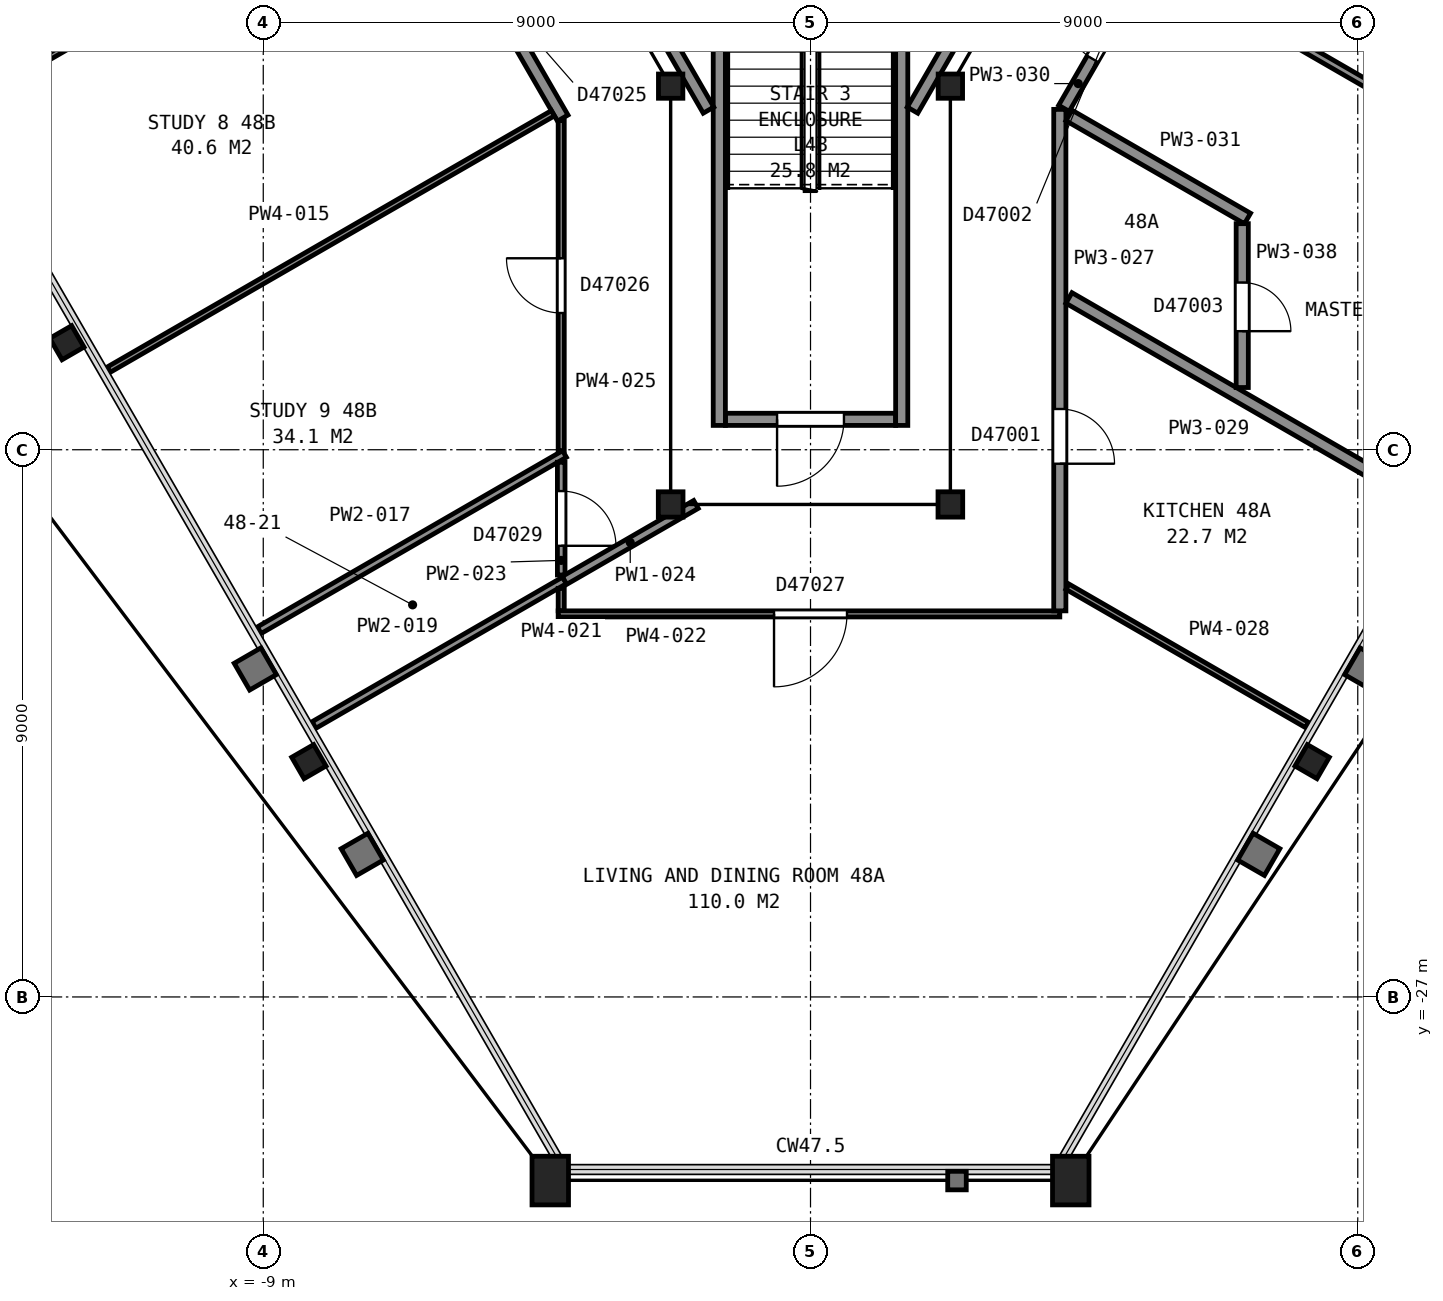
"""IFC4 building model, lengths in metres.
Left out: names, types, materials, properties, quantities, classifications, styles, units other than length and angle.
Written with IfcOpenShell. Run it as: python <this file> out.ifc"""

import sys

from ifc_helpers import new_model, si_unit, direction, frame, frame_2d, origin, origin_2d, place, context, subcontext, project, spatial, rectangle, hollow_rectangle, i_section, extrude, element, fill, save


model = new_model("IFC4")
c1 = context("Model", 3, precision=1e-05, world=origin(), true_north=direction((0.0, 1.0)))
c2 = subcontext(c1, "Body", "Model", "MODEL_VIEW")
j1 = project(units=[si_unit("LENGTHUNIT", "METRE"), si_unit("PLANEANGLEUNIT", "RADIAN")], contexts=[c1])
p1 = place(None, origin())
s1 = spatial("IfcSite", under=j1, at=p1, CompositionType="ELEMENT")
p2 = place(p1, origin())
s2 = spatial("IfcBuilding", under=s1, at=p2, CompositionType="ELEMENT")
p3 = place(p2, frame((0.0, 0.0, 193.2)))
s3 = spatial("IfcBuildingStorey", under=s2, at=p3, CompositionType="ELEMENT", Elevation=193.2)
for number, where, z_axis, x_axis in (
    (1, (-12.23, -16.24, 0.0), (0.0, 0.0, 1.0), (-0.5, 0.866, 0.0)),
    (2, (-8.25, -23.13, 0.0), (0.0, 0.0, 1.0), (-0.5, 0.866, 0.0)),
):
    element("IfcColumn", number, at=place(p3, frame(where, z_axis=z_axis, x_axis=x_axis)), inside=s3, PredefinedType="COLUMN", context=c2, shape_type="SweptSolid", body=[
        extrude(i_section(OverallWidth=0.406, OverallDepth=0.417, WebThickness=0.03, FlangeThickness=0.048, FilletRadius=0.015, at=origin_2d()), origin(), (0.0, 0.0, 1.0), 3.7),
    ])
for number, where, z_axis, x_axis in (
    (3, (-4.28, -30.02, 0.0), (0.0, 0.0, 1.0), (-1.0, 0.0, 0.0)),
    (4, (4.28, -30.02, 0.0), (0.0, 0.0, 1.0), (-1.0, 0.0, 0.0)),
):
    element("IfcColumn", number, at=place(p3, frame(where, z_axis=z_axis, x_axis=x_axis)), inside=s3, PredefinedType="COLUMN", context=c2, shape_type="SweptSolid", body=[
        extrude(hollow_rectangle(XDim=0.6, YDim=0.8, WallThickness=0.05, at=origin_2d()), origin(), (0.0, 0.0, 1.0), 3.7),
    ])
p4 = place(p3, frame((8.25, -23.13, 0.0), z_axis=(0.0, 0.0, 1.0), x_axis=(-0.5, -0.866025403784, 0.0)))
e5 = element("IfcColumn", 5, at=p4, inside=s3, PredefinedType="COLUMN", context=c2, shape_type="SweptSolid", body=[
    extrude(i_section(OverallWidth=0.406, OverallDepth=0.417, WebThickness=0.03, FlangeThickness=0.048, FilletRadius=0.015, at=origin_2d()), origin(), (0.0, 0.0, 1.0), 3.7),
])
p5 = place(p3, frame((-2.3, -12.02, 0.0), z_axis=(0.0, 0.0, 1.0), x_axis=(1.0, 0.0, 0.0)))
e6 = element("IfcColumn", 6, at=p5, inside=s3, PredefinedType="COLUMN", context=c2, shape_type="SweptSolid", body=[
    extrude(i_section(OverallWidth=0.401, OverallDepth=0.399, WebThickness=0.025, FlangeThickness=0.04, FilletRadius=0.015, at=origin_2d()), origin(), (0.0, 0.0, 1.0), 3.7),
])
for number, where, z_axis, x_axis in (
    (7, (-2.3, -18.9, 0.0), (0.0, 0.0, 1.0), (-1.0, 0.0, 0.0)),
    (8, (2.3, -18.9, 0.0), (0.0, 0.0, 1.0), (-1.0, 0.0, 0.0)),
):
    element("IfcColumn", number, at=place(p3, frame(where, z_axis=z_axis, x_axis=x_axis)), inside=s3, PredefinedType="COLUMN", context=c2, shape_type="SweptSolid", body=[
        extrude(i_section(OverallWidth=0.406, OverallDepth=0.417, WebThickness=0.03, FlangeThickness=0.048, FilletRadius=0.015, at=origin_2d()), origin(), (0.0, 0.0, 1.0), 3.7),
    ])
p6 = place(p3, frame((2.3, -12.02, 0.0), z_axis=(0.0, 0.0, 1.0), x_axis=(1.0, 0.0, 0.0)))
e9 = element("IfcColumn", 9, at=p6, inside=s3, PredefinedType="COLUMN", context=c2, shape_type="SweptSolid", body=[
    extrude(i_section(OverallWidth=0.401, OverallDepth=0.399, WebThickness=0.025, FlangeThickness=0.04, FilletRadius=0.015, at=origin_2d()), origin(), (0.0, 0.0, 1.0), 3.7),
])
p7 = place(p3, frame((-1.4, -17.5, 0.0), z_axis=(0.0, 0.0, 1.0), x_axis=(1.0, 0.0, 0.0)))
e10 = element("IfcWall", 10, at=p7, inside=s3, PredefinedType="PARTITIONING", context=c2, shape_type="SweptSolid", body=[
    extrude(rectangle(XDim=2.8, YDim=0.2, at=frame_2d((1.4, 0.0))), origin(), (0.0, 0.0, 1.0), 3.45),
])
p8 = place(p7, frame((0.85, 0.0, 0.0)))
e11 = element("IfcOpeningElement", 11, at=p8, cuts=e10, PredefinedType="OPENING", context=c2, shape_type="SweptSolid", body=[
    extrude(rectangle(XDim=1.1, YDim=2.1, at=frame_2d((0.55, 1.05))), frame((0.0, 0.11, 0.0), z_axis=(0.0, -1.0, 0.0), x_axis=(1.0, 0.0, 0.0)), (0.0, 0.0, 1.0), 0.22),
])
for number, where, z_axis, x_axis in (
    (12, (1.5, -8.0, 0.0), (0.0, 0.0, 1.0), (0.0, -1.0, 0.0)),
    (13, (-1.5, -8.0, 0.0), (0.0, 0.0, 1.0), (0.0, -1.0, 0.0)),
):
    element("IfcWall", number, at=place(p3, frame(where, z_axis=z_axis, x_axis=x_axis)), inside=s3, PredefinedType="PARTITIONING", context=c2, shape_type="SweptSolid", body=[
        extrude(rectangle(XDim=9.6, YDim=0.2, at=frame_2d((4.8, 0.0))), origin(), (0.0, 0.0, 1.0), 3.45),
    ])
p9 = place(p3, frame((-4.655, -7.257, 0.0), z_axis=(0.0, 0.0, 1.0), x_axis=(0.499966124405, -0.866044960985, 0.0)))
e14 = element("IfcWall", 14, at=p9, inside=s3, PredefinedType="PARTITIONING", context=c2, shape_type="SweptSolid", body=[
    extrude(rectangle(XDim=5.956, YDim=0.2, at=frame_2d((2.978, 0.0))), origin(), (0.0, 0.0, 1.0), 3.45),
])
p10 = place(p9, frame((0.45, 0.0, 0.0)))
e15 = element("IfcOpeningElement", 15, at=p10, cuts=e14, PredefinedType="OPENING", context=c2, shape_type="SweptSolid", body=[
    extrude(rectangle(XDim=1.8, YDim=2.1, at=frame_2d((0.9, 1.05))), frame((0.0, 0.11, 0.0), z_axis=(0.0, -1.0, 0.0), x_axis=(1.0, 0.0, 0.0)), (0.0, 0.0, 1.0), 0.22),
])
p11 = place(p3, frame((1.677, -12.415, 0.0), z_axis=(0.0, 0.0, 1.0), x_axis=(0.500054337157, 0.865994029939, 0.0)))
e16 = element("IfcWall", 16, at=p11, inside=s3, PredefinedType="PARTITIONING", context=c2, shape_type="SweptSolid", body=[
    extrude(rectangle(XDim=6.177, YDim=0.2, at=frame_2d((3.088, 0.0))), origin(), (0.0, 0.0, 1.0), 3.45),
])
p12 = place(p3, frame((-14.015, -12.396, 0.0), z_axis=(0.0, 0.0, 1.0), x_axis=(0.866079962101, 0.499905490315, 0.0)))
e17 = element("IfcWall", 17, at=p12, inside=s3, PredefinedType="PARTITIONING", context=c2, shape_type="SweptSolid", body=[
    extrude(rectangle(XDim=8.429, YDim=0.1, at=frame_2d((4.214, 0.0))), origin(), (0.0, 0.0, 1.0), 2.713),
])
p13 = place(p3, frame((-4.075, -12.545, 0.0), z_axis=(0.0, 0.0, 1.0), x_axis=(-0.499999743747, 0.866025551732, 0.0)))
e18 = element("IfcWall", 18, at=p13, inside=s3, PredefinedType="PARTITIONING", context=c2, shape_type="SweptSolid", body=[
    extrude(rectangle(XDim=17.656, YDim=0.2, at=frame_2d((8.828, 0.0))), origin(), (0.0, 0.0, 1.0), 2.713),
])
p14 = place(p13, frame((10.83, 0.0, 0.0)))
e19 = element("IfcOpeningElement", 19, at=p14, cuts=e18, PredefinedType="OPENING", context=c2, shape_type="SweptSolid", body=[
    extrude(rectangle(XDim=0.9, YDim=2.1, at=frame_2d((0.45, 1.05))), frame((0.0, 0.11, 0.0), z_axis=(0.0, -1.0, 0.0), x_axis=(1.0, 0.0, 0.0)), (0.0, 0.0, 1.0), 0.22),
])
p15 = place(p13, frame((7.148, 0.0, 0.0)))
e20 = element("IfcOpeningElement", 20, at=p15, cuts=e18, PredefinedType="OPENING", context=c2, shape_type="SweptSolid", body=[
    extrude(rectangle(XDim=0.9, YDim=2.1, at=frame_2d((0.45, 1.05))), frame((0.0, 0.11, 0.0), z_axis=(0.0, -1.0, 0.0), x_axis=(1.0, 0.0, 0.0)), (0.0, 0.0, 1.0), 0.22),
])
p16 = place(p13, frame((2.198, 0.0, 0.0)))
e21 = element("IfcOpeningElement", 21, at=p16, cuts=e18, PredefinedType="OPENING", context=c2, shape_type="SweptSolid", body=[
    extrude(rectangle(XDim=0.9, YDim=2.1, at=frame_2d((0.45, 1.05))), frame((0.0, 0.11, 0.0), z_axis=(0.0, -1.0, 0.0), x_axis=(1.0, 0.0, 0.0)), (0.0, 0.0, 1.0), 0.22),
])
p17 = place(p3, frame((-11.54, -16.682, 0.0), z_axis=(0.0, 0.0, 1.0), x_axis=(0.866063141794, 0.499934630153, 0.0)))
e22 = element("IfcWall", 22, at=p17, inside=s3, PredefinedType="PARTITIONING", context=c2, shape_type="SweptSolid", body=[
    extrude(rectangle(XDim=8.433, YDim=0.1, at=frame_2d((4.217, 0.0))), origin(), (0.0, 0.0, 1.0), 2.713),
])
p18 = place(p3, frame((-9.066, -20.968, 0.0), z_axis=(0.0, 0.0, 1.0), x_axis=(0.866023559602, 0.500003194204, 0.0)))
e23 = element("IfcWall", 23, at=p18, inside=s3, PredefinedType="PARTITIONING", context=c2, shape_type="SweptSolid", body=[
    extrude(rectangle(XDim=5.796, YDim=0.125, at=frame_2d((2.898, 0.0))), origin(), (0.0, 0.0, 1.0), 2.713),
])
p19 = place(p3, frame((-8.166, -22.527, 0.0), z_axis=(0.0, 0.0, 1.0), x_axis=(0.866042865666, 0.499969753915, 0.0)))
e24 = element("IfcWall", 24, at=p19, inside=s3, PredefinedType="PARTITIONING", context=c2, shape_type="SweptSolid", body=[
    extrude(rectangle(XDim=4.757, YDim=0.125, at=frame_2d((2.378, 0.0))), origin(), (0.0, 0.0, 1.0), 2.713),
])
p20 = place(p3, frame((-4.1, -20.65, 0.0), z_axis=(0.0, 0.0, 1.0), x_axis=(0.0, 1.0, 0.0)))
e25 = element("IfcWall", 25, at=p20, inside=s3, PredefinedType="PARTITIONING", context=c2, shape_type="SweptSolid", body=[
    extrude(rectangle(XDim=0.37, YDim=0.1, at=frame_2d((0.185, 0.0))), origin(), (0.0, 0.0, 1.0), 2.713),
])
p21 = place(p3, frame((4.1, -20.7, 0.0), z_axis=(0.0, 0.0, 1.0), x_axis=(-1.0, 0.0, 0.0)))
e26 = element("IfcWall", 26, at=p21, inside=s3, PredefinedType="PARTITIONING", context=c2, shape_type="SweptSolid", body=[
    extrude(rectangle(XDim=8.25, YDim=0.1, at=frame_2d((4.125, 0.0))), origin(), (0.0, 0.0, 1.0), 2.713),
])
p22 = place(p21, frame((3.5, 0.0, 0.0)))
e27 = element("IfcOpeningElement", 27, at=p22, cuts=e26, PredefinedType="OPENING", context=c2, shape_type="SweptSolid", body=[
    extrude(rectangle(XDim=1.2, YDim=2.1, at=frame_2d((0.6, 1.05))), frame((0.0, 0.06, 0.0), z_axis=(0.0, -1.0, 0.0), x_axis=(1.0, 0.0, 0.0)), (0.0, 0.0, 1.0), 0.12),
])
p23 = place(p3, frame((-4.1, -18.206, 0.0), z_axis=(0.0, 0.0, 1.0), x_axis=(0.0, -1.0, 0.0)))
e28 = element("IfcWall", 28, at=p23, inside=s3, PredefinedType="PARTITIONING", context=c2, shape_type="SweptSolid", body=[
    extrude(rectangle(XDim=1.854, YDim=0.125, at=frame_2d((0.927, 0.0))), origin(), (0.0, 0.0, 1.0), 2.713),
])
p24 = place(p23, frame((0.474, 0.0, 0.0)))
e29 = element("IfcOpeningElement", 29, at=p24, cuts=e28, PredefinedType="OPENING", context=c2, shape_type="SweptSolid", body=[
    extrude(rectangle(XDim=0.9, YDim=2.1, at=frame_2d((0.45, 1.05))), frame((0.0, 0.073, 0.0), z_axis=(0.0, -1.0, 0.0), x_axis=(1.0, 0.0, 0.0)), (0.0, 0.0, 1.0), 0.145),
])
p25 = place(p3, frame((-4.046, -20.149, 0.0), z_axis=(0.0, 0.0, 1.0), x_axis=(0.865916841101, 0.500187988959, 0.0)))
e30 = element("IfcWall", 30, at=p25, inside=s3, PredefinedType="PARTITIONING", context=c2, shape_type="SweptSolid", body=[
    extrude(rectangle(XDim=2.497, YDim=0.15, at=frame_2d((1.248, 0.0))), origin(), (0.0, 0.0, 1.0), 2.713),
])
p26 = place(p3, frame((-4.1, -18.016, 0.0), z_axis=(0.0, 0.0, 1.0), x_axis=(0.0, 1.0, 0.0)))
e31 = element("IfcWall", 31, at=p26, inside=s3, PredefinedType="PARTITIONING", context=c2, shape_type="SweptSolid", body=[
    extrude(rectangle(XDim=5.429, YDim=0.1, at=frame_2d((2.715, 0.0))), origin(), (0.0, 0.0, 1.0), 2.713),
])
p27 = place(p26, frame((2.265, 0.0, 0.0)))
e32 = element("IfcOpeningElement", 32, at=p27, cuts=e31, PredefinedType="OPENING", context=c2, shape_type="SweptSolid", body=[
    extrude(rectangle(XDim=0.9, YDim=2.1, at=frame_2d((0.45, 1.05))), frame((0.0, 0.06, 0.0), z_axis=(0.0, -1.0, 0.0), x_axis=(1.0, 0.0, 0.0)), (0.0, 0.0, 1.0), 0.12),
])
p28 = place(p3, frame((4.1, -12.402, 0.0), z_axis=(0.0, 0.0, 1.0), x_axis=(0.0, -1.0, 0.0)))
e33 = element("IfcWall", 33, at=p28, inside=s3, PredefinedType="PARTITIONING", context=c2, shape_type="SweptSolid", body=[
    extrude(rectangle(XDim=8.248, YDim=0.2, at=frame_2d((4.124, 0.0))), origin(), (0.0, 0.0, 1.0), 2.713),
])
p29 = place(p28, frame((4.928, 0.0, 0.0)))
e34 = element("IfcOpeningElement", 34, at=p29, cuts=e33, PredefinedType="OPENING", context=c2, shape_type="SweptSolid", body=[
    extrude(rectangle(XDim=0.9, YDim=2.1, at=frame_2d((0.45, 1.05))), frame((0.0, 0.11, 0.0), z_axis=(0.0, -1.0, 0.0), x_axis=(1.0, 0.0, 0.0)), (0.0, 0.0, 1.0), 0.22),
])
p30 = place(p3, frame((4.225, -20.252, 0.0), z_axis=(0.0, 0.0, 1.0), x_axis=(0.866048884701, -0.499959327653, 0.0)))
e35 = element("IfcWall", 35, at=p30, inside=s3, PredefinedType="PARTITIONING", context=c2, shape_type="SweptSolid", body=[
    extrude(rectangle(XDim=4.55, YDim=0.1, at=frame_2d((2.275, 0.0))), origin(), (0.0, 0.0, 1.0), 2.713),
])
p31 = place(p3, frame((4.25, -15.504, 0.0), z_axis=(0.0, 0.0, 1.0), x_axis=(0.866025383743, -0.500000034713, 0.0)))
e36 = element("IfcWall", 36, at=p31, inside=s3, PredefinedType="PARTITIONING", context=c2, shape_type="SweptSolid", body=[
    extrude(rectangle(XDim=6.903, YDim=0.2, at=frame_2d((3.451, 0.0))), origin(), (0.0, 0.0, 1.0), 2.713),
])
p32 = place(p3, frame((5.556, -9.98, 0.0), z_axis=(0.0, 0.0, 1.0), x_axis=(-0.499940639567, -0.866059672834, 0.0)))
e37 = element("IfcWall", 37, at=p32, inside=s3, PredefinedType="PARTITIONING", context=c2, shape_type="SweptSolid", body=[
    extrude(rectangle(XDim=2.777, YDim=0.2, at=frame_2d((1.388, 0.0))), origin(), (0.0, 0.0, 1.0), 2.713),
])
p33 = place(p32, frame((0.937, 0.0, 0.0)))
e38 = element("IfcOpeningElement", 38, at=p33, cuts=e37, PredefinedType="OPENING", context=c2, shape_type="SweptSolid", body=[
    extrude(rectangle(XDim=0.9, YDim=2.1, at=frame_2d((0.45, 1.05))), frame((0.0, 0.11, 0.0), z_axis=(0.0, -1.0, 0.0), x_axis=(1.0, 0.0, 0.0)), (0.0, 0.0, 1.0), 0.22),
])
p34 = place(p3, frame((4.25, -12.502, 0.0), z_axis=(0.0, 0.0, 1.0), x_axis=(0.866032087317, -0.499988423603, 0.0)))
e39 = element("IfcWall", 39, at=p34, inside=s3, PredefinedType="PARTITIONING", context=c2, shape_type="SweptSolid", body=[
    extrude(rectangle(XDim=3.39, YDim=0.2, at=frame_2d((1.695, 0.0))), origin(), (0.0, 0.0, 1.0), 2.713),
])
p35 = place(p3, frame((5.533, -9.895, 0.0), z_axis=(0.0, 0.0, 1.0), x_axis=(0.865995449608, -0.500051878567, 0.0)))
e40 = element("IfcWall", 40, at=p35, inside=s3, PredefinedType="PARTITIONING", context=c2, shape_type="SweptSolid", body=[
    extrude(rectangle(XDim=8.596, YDim=0.125, at=frame_2d((4.298, 0.0))), origin(), (0.0, 0.0, 1.0), 2.713),
])
p36 = place(p3, frame((6.576, -8.419, 0.0), z_axis=(0.0, 0.0, 1.0), x_axis=(0.866048155274, -0.499960591193, 0.0)))
e41 = element("IfcWall", 41, at=p36, inside=s3, PredefinedType="PARTITIONING", context=c2, shape_type="SweptSolid", body=[
    extrude(rectangle(XDim=8.431, YDim=0.125, at=frame_2d((4.215, 0.0))), origin(), (0.0, 0.0, 1.0), 2.713),
])
p37 = place(p3, frame((7.1, -16.977, 0.0), z_axis=(0.0, 0.0, 1.0), x_axis=(0.0, 1.0, 0.0)))
e42 = element("IfcWall", 42, at=p37, inside=s3, PredefinedType="PARTITIONING", context=c2, shape_type="SweptSolid", body=[
    extrude(rectangle(XDim=2.695, YDim=0.2, at=frame_2d((1.347, 0.0))), origin(), (0.0, 0.0, 1.0), 2.713),
])
p38 = place(p37, frame((0.927, 0.0, 0.0)))
e43 = element("IfcOpeningElement", 43, at=p38, cuts=e42, PredefinedType="OPENING", context=c2, shape_type="SweptSolid", body=[
    extrude(rectangle(XDim=0.8, YDim=2.1, at=frame_2d((0.4, 1.05))), frame((0.0, 0.11, 0.0), z_axis=(0.0, -1.0, 0.0), x_axis=(1.0, 0.0, 0.0)), (0.0, 0.0, 1.0), 0.22),
])
p39 = place(p8, origin())
e44 = element("IfcDoor", 44, at=p39, inside=s3, OperationType="SINGLE_SWING_LEFT", PredefinedType="DOOR", context=c2, shape_type="SweptSolid", body=[
    extrude(rectangle(XDim=1.1, YDim=2.1, at=frame_2d((0.55, 1.05))), frame((0.0, 0.025, 0.0), z_axis=(0.0, -1.0, 0.0), x_axis=(1.0, 0.0, 0.0)), (0.0, 0.0, 1.0), 0.05),
])
fill(e11, e44)
p40 = place(p22, origin())
e45 = element("IfcDoor", 45, at=p40, inside=s3, OperationType="SINGLE_SWING_RIGHT", PredefinedType="DOOR", context=c2, shape_type="SweptSolid", body=[
    extrude(rectangle(XDim=1.2, YDim=2.1, at=frame_2d((0.6, 1.05))), frame((0.0, 0.025, 0.0), z_axis=(0.0, -1.0, 0.0), x_axis=(1.0, 0.0, 0.0)), (0.0, 0.0, 1.0), 0.05),
])
fill(e27, e45)
p41 = place(p24, origin())
e46 = element("IfcDoor", 46, at=p41, inside=s3, OperationType="SINGLE_SWING_RIGHT", PredefinedType="DOOR", context=c2, shape_type="SweptSolid", body=[
    extrude(rectangle(XDim=0.9, YDim=2.1, at=frame_2d((0.45, 1.05))), frame((0.0, 0.025, 0.0), z_axis=(0.0, -1.0, 0.0), x_axis=(1.0, 0.0, 0.0)), (0.0, 0.0, 1.0), 0.05),
])
fill(e29, e46)
p42 = place(p27, origin())
e47 = element("IfcDoor", 47, at=p42, inside=s3, OperationType="SINGLE_SWING_RIGHT", PredefinedType="DOOR", context=c2, shape_type="SweptSolid", body=[
    extrude(rectangle(XDim=0.9, YDim=2.1, at=frame_2d((0.45, 1.05))), frame((0.0, 0.025, 0.0), z_axis=(0.0, -1.0, 0.0), x_axis=(1.0, 0.0, 0.0)), (0.0, 0.0, 1.0), 0.05),
])
fill(e32, e47)
p43 = place(p29, origin())
e48 = element("IfcDoor", 48, at=p43, inside=s3, OperationType="SINGLE_SWING_RIGHT", PredefinedType="DOOR", context=c2, shape_type="SweptSolid", body=[
    extrude(rectangle(XDim=0.9, YDim=2.1, at=frame_2d((0.45, 1.05))), frame((0.0, 0.025, 0.0), z_axis=(0.0, -1.0, 0.0), x_axis=(1.0, 0.0, 0.0)), (0.0, 0.0, 1.0), 0.05),
])
fill(e34, e48)
p44 = place(p33, origin())
e49 = element("IfcDoor", 49, at=p44, inside=s3, OperationType="SINGLE_SWING_LEFT", PredefinedType="DOOR", context=c2, shape_type="SweptSolid", body=[
    extrude(rectangle(XDim=0.9, YDim=2.1, at=frame_2d((0.45, 1.05))), frame((0.0, 0.025, 0.0), z_axis=(0.0, -1.0, 0.0), x_axis=(1.0, 0.0, 0.0)), (0.0, 0.0, 1.0), 0.05),
])
fill(e38, e49)
p45 = place(p38, origin())
e50 = element("IfcDoor", 50, at=p45, inside=s3, OperationType="SINGLE_SWING_LEFT", PredefinedType="DOOR", context=c2, shape_type="SweptSolid", body=[
    extrude(rectangle(XDim=0.8, YDim=2.1, at=frame_2d((0.4, 1.05))), frame((0.0, 0.025, 0.0), z_axis=(0.0, -1.0, 0.0), x_axis=(1.0, 0.0, 0.0)), (0.0, 0.0, 1.0), 0.05),
])
fill(e43, e50)
save(model, sys.argv[1])
